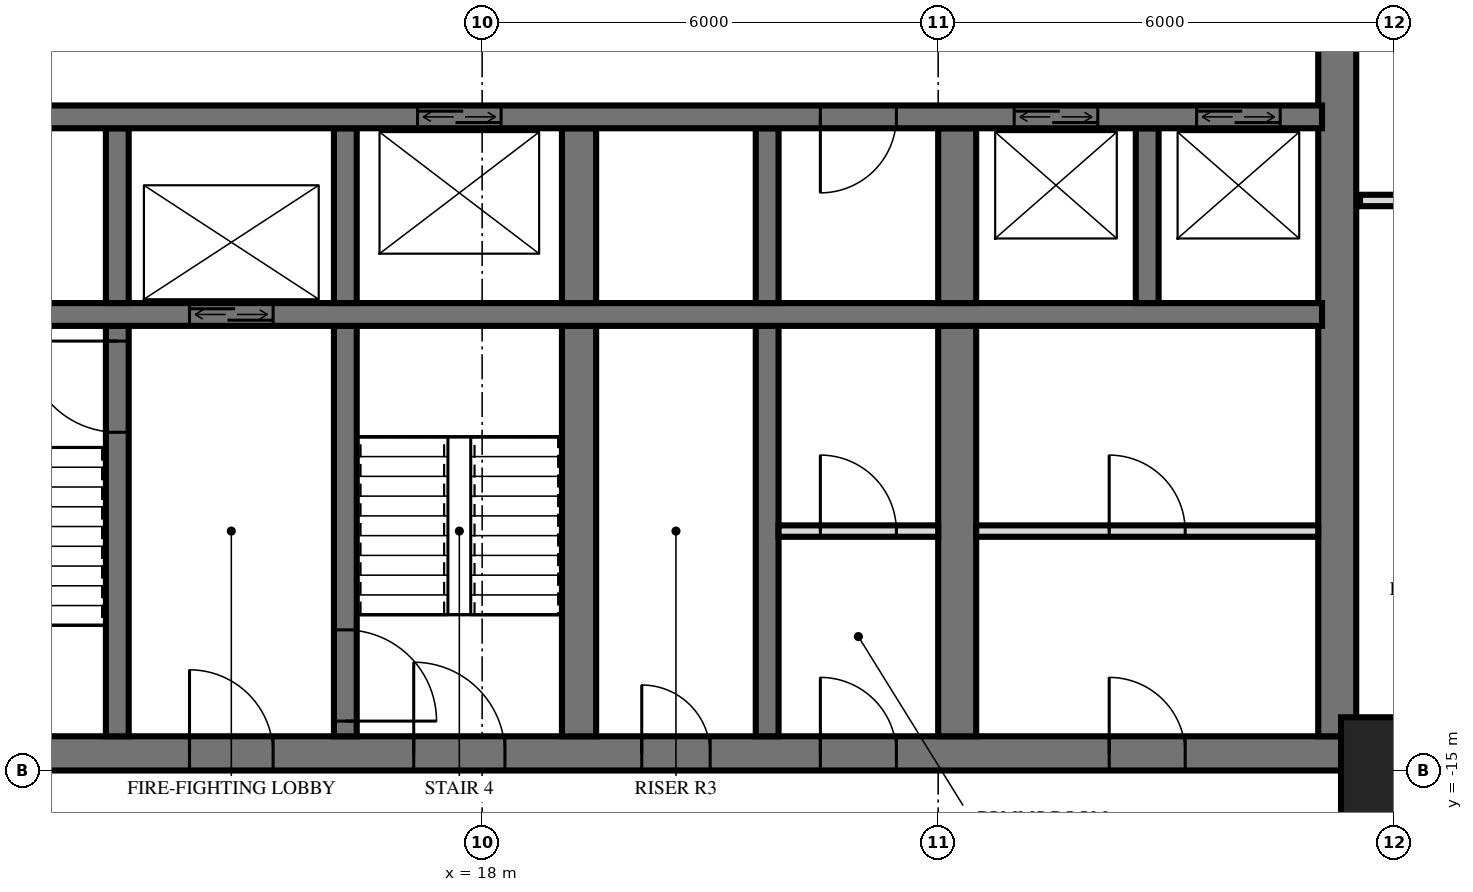
"""IFC4 building model, lengths in metres.
Left out: names, types, materials, properties, quantities, classifications, styles, units other than length and angle.
Written with IfcOpenShell. Run it as: python <this file> out.ifc"""

import sys

from ifc_helpers import new_model, si_unit, direction, frame, frame_2d, origin, origin_2d, place, context, subcontext, project, spatial, rectangle, extrude, element, fill, save


model = new_model("IFC4")
c1 = context("Model", 3, precision=1e-05, world=origin(), true_north=direction((0.0, 1.0)))
c2 = subcontext(c1, "Body", "Model", "MODEL_VIEW")
j1 = project(units=[si_unit("LENGTHUNIT", "METRE"), si_unit("PLANEANGLEUNIT", "RADIAN")], contexts=[c1])
p1 = place(None, origin())
s1 = spatial("IfcSite", under=j1, at=p1, CompositionType="ELEMENT")
p2 = place(p1, origin())
s2 = spatial("IfcBuilding", under=s1, at=p2, CompositionType="ELEMENT")
p3 = place(p2, frame((0.0, 0.0, 24.0)))
s3 = spatial("IfcBuildingStorey", under=s2, at=p3, CompositionType="ELEMENT", Elevation=24.0)
p4 = place(p3, frame((30.0, -15.0, -0.28), z_axis=(0.0, 0.0, 1.0), x_axis=(1.0, 0.0, 0.0)))
e1 = element("IfcColumn", 1, at=p4, inside=s3, PredefinedType="COLUMN", context=c2, shape_type="SweptSolid", body=[
    extrude(rectangle(XDim=1.4, YDim=1.4, at=origin_2d()), origin(), (0.0, 0.0, 1.0), 3.88),
])
p5 = place(p3, frame((10.0, -14.775, 0.0), z_axis=(0.0, 0.0, 1.0), x_axis=(1.0, 0.0, 0.0)))
e2 = element("IfcWall", 2, at=p5, inside=s3, PredefinedType="SHEAR", context=c2, shape_type="SweptSolid", body=[
    extrude(rectangle(XDim=19.5, YDim=0.45, at=frame_2d((9.75, 0.0))), origin(), (0.0, 0.0, 1.0), 3.6),
])
p6 = place(p5, frame((7.1, 0.0, 0.0)))
e3 = element("IfcOpeningElement", 3, at=p6, cuts=e2, PredefinedType="OPENING", context=c2, shape_type="SweptSolid", body=[
    extrude(rectangle(XDim=1.2, YDim=2.1, at=frame_2d((0.6, 1.05))), frame((0.0, 0.235, 0.0), z_axis=(0.0, -1.0, 0.0), x_axis=(1.0, 0.0, 0.0)), (0.0, 0.0, 1.0), 0.47),
])
p7 = place(p5, frame((4.15, 0.0, 0.0)))
e4 = element("IfcOpeningElement", 4, at=p7, cuts=e2, PredefinedType="OPENING", context=c2, shape_type="SweptSolid", body=[
    extrude(rectangle(XDim=1.1, YDim=2.1, at=frame_2d((0.55, 1.05))), frame((0.0, 0.235, 0.0), z_axis=(0.0, -1.0, 0.0), x_axis=(1.0, 0.0, 0.0)), (0.0, 0.0, 1.0), 0.47),
])
p8 = place(p5, frame((10.1, 0.0, 0.0)))
e5 = element("IfcOpeningElement", 5, at=p8, cuts=e2, PredefinedType="OPENING", context=c2, shape_type="SweptSolid", body=[
    extrude(rectangle(XDim=0.9, YDim=2.1, at=frame_2d((0.45, 1.05))), frame((0.0, 0.235, 0.0), z_axis=(0.0, -1.0, 0.0), x_axis=(1.0, 0.0, 0.0)), (0.0, 0.0, 1.0), 0.47),
])
p9 = place(p5, frame((12.45, 0.0, 0.0)))
e6 = element("IfcOpeningElement", 6, at=p9, cuts=e2, PredefinedType="OPENING", context=c2, shape_type="SweptSolid", body=[
    extrude(rectangle(XDim=1.0, YDim=2.1, at=frame_2d((0.5, 1.05))), frame((0.0, 0.235, 0.0), z_axis=(0.0, -1.0, 0.0), x_axis=(1.0, 0.0, 0.0)), (0.0, 0.0, 1.0), 0.47),
])
p10 = place(p5, frame((16.25, 0.0, 0.0)))
e7 = element("IfcOpeningElement", 7, at=p10, cuts=e2, PredefinedType="OPENING", context=c2, shape_type="SweptSolid", body=[
    extrude(rectangle(XDim=1.0, YDim=2.1, at=frame_2d((0.5, 1.05))), frame((0.0, 0.235, 0.0), z_axis=(0.0, -1.0, 0.0), x_axis=(1.0, 0.0, 0.0)), (0.0, 0.0, 1.0), 0.47),
])
p11 = place(p3, frame((29.25, -14.55, 0.0), z_axis=(0.0, 0.0, 1.0), x_axis=(0.0, 1.0, 0.0)))
e8 = element("IfcWall", 8, at=p11, inside=s3, PredefinedType="SHEAR", context=c2, shape_type="SweptSolid", body=[
    extrude(rectangle(XDim=14.1, YDim=0.5, at=frame_2d((7.05, 0.0))), origin(), (0.0, 0.0, 1.0), 3.6),
])
p12 = place(p3, frame((10.35, -6.4, 0.0), z_axis=(0.0, 0.0, 1.0), x_axis=(1.0, 0.0, 0.0)))
e9 = element("IfcWall", 9, at=p12, inside=s3, PredefinedType="SHEAR", context=c2, shape_type="SweptSolid", body=[
    extrude(rectangle(XDim=18.7, YDim=0.3, at=frame_2d((9.35, 0.0))), origin(), (0.0, 0.0, 1.0), 3.6),
])
p13 = place(p12, frame((14.65, 0.0, 0.0)))
e10 = element("IfcOpeningElement", 10, at=p13, cuts=e9, PredefinedType="OPENING", context=c2, shape_type="SweptSolid", body=[
    extrude(rectangle(XDim=1.1, YDim=2.1, at=frame_2d((0.55, 1.05))), frame((0.0, 0.16, 0.0), z_axis=(0.0, -1.0, 0.0), x_axis=(1.0, 0.0, 0.0)), (0.0, 0.0, 1.0), 0.32),
])
p14 = place(p12, frame((17.05, 0.0, 0.0)))
e11 = element("IfcOpeningElement", 11, at=p14, cuts=e9, PredefinedType="OPENING", context=c2, shape_type="SweptSolid", body=[
    extrude(rectangle(XDim=1.1, YDim=2.1, at=frame_2d((0.55, 1.05))), frame((0.0, 0.16, 0.0), z_axis=(0.0, -1.0, 0.0), x_axis=(1.0, 0.0, 0.0)), (0.0, 0.0, 1.0), 0.32),
])
p15 = place(p12, frame((6.8, 0.0, 0.0)))
e12 = element("IfcOpeningElement", 12, at=p15, cuts=e9, PredefinedType="OPENING", context=c2, shape_type="SweptSolid", body=[
    extrude(rectangle(XDim=1.1, YDim=2.1, at=frame_2d((0.55, 1.05))), frame((0.0, 0.16, 0.0), z_axis=(0.0, -1.0, 0.0), x_axis=(1.0, 0.0, 0.0)), (0.0, 0.0, 1.0), 0.32),
])
p16 = place(p12, frame((12.1, 0.0, 0.0)))
e13 = element("IfcOpeningElement", 13, at=p16, cuts=e9, PredefinedType="OPENING", context=c2, shape_type="SweptSolid", body=[
    extrude(rectangle(XDim=1.0, YDim=2.1, at=frame_2d((0.5, 1.05))), frame((0.0, 0.16, 0.0), z_axis=(0.0, -1.0, 0.0), x_axis=(1.0, 0.0, 0.0)), (0.0, 0.0, 1.0), 0.32),
])
p17 = place(p3, frame((10.35, -9.0, 0.0), z_axis=(0.0, 0.0, 1.0), x_axis=(1.0, 0.0, 0.0)))
e14 = element("IfcWall", 14, at=p17, inside=s3, PredefinedType="SHEAR", context=c2, shape_type="SweptSolid", body=[
    extrude(rectangle(XDim=18.7, YDim=0.3, at=frame_2d((9.35, 0.0))), origin(), (0.0, 0.0, 1.0), 3.6),
])
p18 = place(p17, frame((3.8, 0.0, 0.0)))
e15 = element("IfcOpeningElement", 15, at=p18, cuts=e14, PredefinedType="OPENING", context=c2, shape_type="SweptSolid", body=[
    extrude(rectangle(XDim=1.1, YDim=2.1, at=frame_2d((0.55, 1.05))), frame((0.0, 0.16, 0.0), z_axis=(0.0, -1.0, 0.0), x_axis=(1.0, 0.0, 0.0)), (0.0, 0.0, 1.0), 0.32),
])
p19 = place(p3, frame((13.2, -8.85, 0.0), z_axis=(0.0, 0.0, 1.0), x_axis=(0.0, 1.0, 0.0)))
e16 = element("IfcWall", 16, at=p19, inside=s3, PredefinedType="SHEAR", context=c2, shape_type="SweptSolid", body=[
    extrude(rectangle(XDim=2.3, YDim=0.3, at=frame_2d((1.15, 0.0))), origin(), (0.0, 0.0, 1.0), 3.6),
])
p20 = place(p3, frame((13.2, -14.55, 0.0), z_axis=(0.0, 0.0, 1.0), x_axis=(0.0, 1.0, 0.0)))
e17 = element("IfcWall", 17, at=p20, inside=s3, PredefinedType="SHEAR", context=c2, shape_type="SweptSolid", body=[
    extrude(rectangle(XDim=5.4, YDim=0.3, at=frame_2d((2.7, 0.0))), origin(), (0.0, 0.0, 1.0), 3.6),
])
p21 = place(p20, frame((4.0, 0.0, 0.0)))
e18 = element("IfcOpeningElement", 18, at=p21, cuts=e17, PredefinedType="OPENING", context=c2, shape_type="SweptSolid", body=[
    extrude(rectangle(XDim=1.2, YDim=2.1, at=frame_2d((0.6, 1.05))), frame((0.0, 0.16, 0.0), z_axis=(0.0, -1.0, 0.0), x_axis=(1.0, 0.0, 0.0)), (0.0, 0.0, 1.0), 0.32),
])
p22 = place(p3, frame((16.2, -8.85, 0.0), z_axis=(0.0, 0.0, 1.0), x_axis=(0.0, 1.0, 0.0)))
e19 = element("IfcWall", 19, at=p22, inside=s3, PredefinedType="SHEAR", context=c2, shape_type="SweptSolid", body=[
    extrude(rectangle(XDim=2.3, YDim=0.3, at=frame_2d((1.15, 0.0))), origin(), (0.0, 0.0, 1.0), 3.6),
])
p23 = place(p3, frame((16.2, -14.55, 0.0), z_axis=(0.0, 0.0, 1.0), x_axis=(0.0, 1.0, 0.0)))
e20 = element("IfcWall", 20, at=p23, inside=s3, PredefinedType="SHEAR", context=c2, shape_type="SweptSolid", body=[
    extrude(rectangle(XDim=5.4, YDim=0.3, at=frame_2d((2.7, 0.0))), origin(), (0.0, 0.0, 1.0), 3.6),
])
p24 = place(p23, frame((0.2, 0.0, 0.0)))
e21 = element("IfcOpeningElement", 21, at=p24, cuts=e20, PredefinedType="OPENING", context=c2, shape_type="SweptSolid", body=[
    extrude(rectangle(XDim=1.2, YDim=2.1, at=frame_2d((0.6, 1.05))), frame((0.0, 0.16, 0.0), z_axis=(0.0, -1.0, 0.0), x_axis=(1.0, 0.0, 0.0)), (0.0, 0.0, 1.0), 0.32),
])
p25 = place(p3, frame((19.275, -8.85, 0.0), z_axis=(0.0, 0.0, 1.0), x_axis=(0.0, 1.0, 0.0)))
e22 = element("IfcWall", 22, at=p25, inside=s3, PredefinedType="SHEAR", context=c2, shape_type="SweptSolid", body=[
    extrude(rectangle(XDim=2.3, YDim=0.45, at=frame_2d((1.15, 0.0))), origin(), (0.0, 0.0, 1.0), 3.6),
])
p26 = place(p3, frame((19.275, -14.55, 0.0), z_axis=(0.0, 0.0, 1.0), x_axis=(0.0, 1.0, 0.0)))
e23 = element("IfcWall", 23, at=p26, inside=s3, PredefinedType="SHEAR", context=c2, shape_type="SweptSolid", body=[
    extrude(rectangle(XDim=5.4, YDim=0.45, at=frame_2d((2.7, 0.0))), origin(), (0.0, 0.0, 1.0), 3.6),
])
p27 = place(p3, frame((21.75, -8.85, 0.0), z_axis=(0.0, 0.0, 1.0), x_axis=(0.0, 1.0, 0.0)))
e24 = element("IfcWall", 24, at=p27, inside=s3, PredefinedType="SHEAR", context=c2, shape_type="SweptSolid", body=[
    extrude(rectangle(XDim=2.3, YDim=0.3, at=frame_2d((1.15, 0.0))), origin(), (0.0, 0.0, 1.0), 3.6),
])
p28 = place(p3, frame((21.75, -14.55, 0.0), z_axis=(0.0, 0.0, 1.0), x_axis=(0.0, 1.0, 0.0)))
e25 = element("IfcWall", 25, at=p28, inside=s3, PredefinedType="SHEAR", context=c2, shape_type="SweptSolid", body=[
    extrude(rectangle(XDim=5.4, YDim=0.3, at=frame_2d((2.7, 0.0))), origin(), (0.0, 0.0, 1.0), 3.6),
])
p29 = place(p3, frame((24.25, -8.85, 0.0), z_axis=(0.0, 0.0, 1.0), x_axis=(0.0, 1.0, 0.0)))
e26 = element("IfcWall", 26, at=p29, inside=s3, PredefinedType="SHEAR", context=c2, shape_type="SweptSolid", body=[
    extrude(rectangle(XDim=2.3, YDim=0.5, at=frame_2d((1.15, 0.0))), origin(), (0.0, 0.0, 1.0), 3.6),
])
p30 = place(p3, frame((24.25, -14.55, 0.0), z_axis=(0.0, 0.0, 1.0), x_axis=(0.0, 1.0, 0.0)))
e27 = element("IfcWall", 27, at=p30, inside=s3, PredefinedType="SHEAR", context=c2, shape_type="SweptSolid", body=[
    extrude(rectangle(XDim=5.4, YDim=0.5, at=frame_2d((2.7, 0.0))), origin(), (0.0, 0.0, 1.0), 3.6),
])
p31 = place(p3, frame((26.75, -8.85, 0.0), z_axis=(0.0, 0.0, 1.0), x_axis=(0.0, 1.0, 0.0)))
e28 = element("IfcWall", 28, at=p31, inside=s3, PredefinedType="SHEAR", context=c2, shape_type="SweptSolid", body=[
    extrude(rectangle(XDim=2.3, YDim=0.3, at=frame_2d((1.15, 0.0))), origin(), (0.0, 0.0, 1.0), 3.6),
])
p32 = place(p3, frame((21.9, -11.85, 0.0), z_axis=(0.0, 0.0, 1.0), x_axis=(1.0, 0.0, 0.0)))
e29 = element("IfcWall", 29, at=p32, inside=s3, PredefinedType="PARTITIONING", context=c2, shape_type="SweptSolid", body=[
    extrude(rectangle(XDim=2.1, YDim=0.15, at=frame_2d((1.05, 0.0))), origin(), (0.0, 0.0, 1.0), 3.3),
])
p33 = place(p32, frame((0.55, 0.0, 0.0)))
e30 = element("IfcOpeningElement", 30, at=p33, cuts=e29, PredefinedType="OPENING", context=c2, shape_type="SweptSolid", body=[
    extrude(rectangle(XDim=1.0, YDim=2.1, at=frame_2d((0.5, 1.05))), frame((0.0, 0.085, 0.0), z_axis=(0.0, -1.0, 0.0), x_axis=(1.0, 0.0, 0.0)), (0.0, 0.0, 1.0), 0.17),
])
p34 = place(p3, frame((24.5, -11.85, 0.0), z_axis=(0.0, 0.0, 1.0), x_axis=(1.0, 0.0, 0.0)))
e31 = element("IfcWall", 31, at=p34, inside=s3, PredefinedType="PARTITIONING", context=c2, shape_type="SweptSolid", body=[
    extrude(rectangle(XDim=4.5, YDim=0.15, at=frame_2d((2.25, 0.0))), origin(), (0.0, 0.0, 1.0), 3.3),
])
p35 = place(p34, frame((1.75, 0.0, 0.0)))
e32 = element("IfcOpeningElement", 32, at=p35, cuts=e31, PredefinedType="OPENING", context=c2, shape_type="SweptSolid", body=[
    extrude(rectangle(XDim=1.0, YDim=2.1, at=frame_2d((0.5, 1.05))), frame((0.0, 0.085, 0.0), z_axis=(0.0, -1.0, 0.0), x_axis=(1.0, 0.0, 0.0)), (0.0, 0.0, 1.0), 0.17),
])
p36 = place(p3, frame((29.55, -15.0, 0.0), z_axis=(0.0, 0.0, 1.0), x_axis=(1.0, 0.0, 0.0)))
e33 = element("IfcWall", 33, at=p36, inside=s3, PredefinedType="PARTITIONING", context=c2, shape_type="SweptSolid", body=[
    extrude(rectangle(XDim=3.57, YDim=0.15, at=frame_2d((1.785, 0.0))), origin(), (0.0, 0.0, 1.0), 3.32),
])
p37 = place(p36, frame((1.205, 0.0, 0.0)))
e34 = element("IfcOpeningElement", 34, at=p37, cuts=e33, PredefinedType="OPENING", context=c2, shape_type="SweptSolid", body=[
    extrude(rectangle(XDim=0.8, YDim=2.1, at=frame_2d((0.4, 1.05))), frame((0.0, 0.085, 0.0), z_axis=(0.0, -1.0, 0.0), x_axis=(1.0, 0.0, 0.0)), (0.0, 0.0, 1.0), 0.17),
])
p38 = place(p3, frame((29.55, -7.5, 0.0), z_axis=(0.0, 0.0, 1.0), x_axis=(1.0, 0.0, 0.0)))
e35 = element("IfcWall", 35, at=p38, inside=s3, PredefinedType="PLUMBINGWALL", context=c2, shape_type="SweptSolid", body=[
    extrude(rectangle(XDim=3.57, YDim=0.15, at=frame_2d((1.785, 0.0))), origin(), (0.0, 0.0, 1.0), 3.32),
])
p39 = place(p38, frame((1.4, 0.0, 0.0)))
e36 = element("IfcOpeningElement", 36, at=p39, cuts=e35, PredefinedType="OPENING", context=c2, shape_type="SweptSolid", body=[
    extrude(rectangle(XDim=0.9, YDim=2.1, at=frame_2d((0.45, 1.05))), frame((0.0, 0.085, 0.0), z_axis=(0.0, -1.0, 0.0), x_axis=(1.0, 0.0, 0.0)), (0.0, 0.0, 1.0), 0.17),
])
p40 = place(p13, origin())
e37 = element("IfcDoor", 37, at=p40, inside=s3, OperationType="DOUBLE_DOOR_SLIDING", PredefinedType="USERDEFINED", context=c2, shape_type="SweptSolid", body=[
    extrude(rectangle(XDim=1.1, YDim=2.1, at=frame_2d((0.55, 1.05))), frame((0.0, 0.025, 0.0), z_axis=(0.0, -1.0, 0.0), x_axis=(1.0, 0.0, 0.0)), (0.0, 0.0, 1.0), 0.05),
])
fill(e10, e37)
p41 = place(p14, origin())
e38 = element("IfcDoor", 38, at=p41, inside=s3, OperationType="DOUBLE_DOOR_SLIDING", PredefinedType="USERDEFINED", context=c2, shape_type="SweptSolid", body=[
    extrude(rectangle(XDim=1.1, YDim=2.1, at=frame_2d((0.55, 1.05))), frame((0.0, 0.025, 0.0), z_axis=(0.0, -1.0, 0.0), x_axis=(1.0, 0.0, 0.0)), (0.0, 0.0, 1.0), 0.05),
])
fill(e11, e38)
p42 = place(p18, origin())
e39 = element("IfcDoor", 39, at=p42, inside=s3, OperationType="DOUBLE_DOOR_SLIDING", PredefinedType="USERDEFINED", context=c2, shape_type="SweptSolid", body=[
    extrude(rectangle(XDim=1.1, YDim=2.1, at=frame_2d((0.55, 1.05))), frame((0.0, 0.025, 0.0), z_axis=(0.0, -1.0, 0.0), x_axis=(1.0, 0.0, 0.0)), (0.0, 0.0, 1.0), 0.05),
])
fill(e15, e39)
p43 = place(p15, origin())
e40 = element("IfcDoor", 40, at=p43, inside=s3, OperationType="DOUBLE_DOOR_SLIDING", PredefinedType="USERDEFINED", context=c2, shape_type="SweptSolid", body=[
    extrude(rectangle(XDim=1.1, YDim=2.1, at=frame_2d((0.55, 1.05))), frame((0.0, 0.025, 0.0), z_axis=(0.0, -1.0, 0.0), x_axis=(1.0, 0.0, 0.0)), (0.0, 0.0, 1.0), 0.05),
])
fill(e12, e40)
p44 = place(p6, origin())
e41 = element("IfcDoor", 41, at=p44, inside=s3, OperationType="SINGLE_SWING_RIGHT", PredefinedType="DOOR", context=c2, shape_type="SweptSolid", body=[
    extrude(rectangle(XDim=1.2, YDim=2.1, at=frame_2d((0.6, 1.05))), frame((0.0, 0.025, 0.0), z_axis=(0.0, -1.0, 0.0), x_axis=(1.0, 0.0, 0.0)), (0.0, 0.0, 1.0), 0.05),
])
fill(e3, e41)
p45 = place(p7, origin())
e42 = element("IfcDoor", 42, at=p45, inside=s3, OperationType="SINGLE_SWING_RIGHT", PredefinedType="DOOR", context=c2, shape_type="SweptSolid", body=[
    extrude(rectangle(XDim=1.1, YDim=2.1, at=frame_2d((0.55, 1.05))), frame((0.0, 0.025, 0.0), z_axis=(0.0, -1.0, 0.0), x_axis=(1.0, 0.0, 0.0)), (0.0, 0.0, 1.0), 0.05),
])
fill(e4, e42)
p46 = place(p8, origin())
e43 = element("IfcDoor", 43, at=p46, inside=s3, OperationType="SINGLE_SWING_RIGHT", PredefinedType="DOOR", context=c2, shape_type="SweptSolid", body=[
    extrude(rectangle(XDim=0.9, YDim=2.1, at=frame_2d((0.45, 1.05))), frame((0.0, 0.025, 0.0), z_axis=(0.0, -1.0, 0.0), x_axis=(1.0, 0.0, 0.0)), (0.0, 0.0, 1.0), 0.05),
])
fill(e5, e43)
p47 = place(p9, origin())
e44 = element("IfcDoor", 44, at=p47, inside=s3, OperationType="SINGLE_SWING_RIGHT", PredefinedType="DOOR", context=c2, shape_type="SweptSolid", body=[
    extrude(rectangle(XDim=1.0, YDim=2.1, at=frame_2d((0.5, 1.05))), frame((0.0, 0.025, 0.0), z_axis=(0.0, -1.0, 0.0), x_axis=(1.0, 0.0, 0.0)), (0.0, 0.0, 1.0), 0.05),
])
fill(e6, e44)
p48 = place(p10, origin())
e45 = element("IfcDoor", 45, at=p48, inside=s3, OperationType="SINGLE_SWING_RIGHT", PredefinedType="DOOR", context=c2, shape_type="SweptSolid", body=[
    extrude(rectangle(XDim=1.0, YDim=2.1, at=frame_2d((0.5, 1.05))), frame((0.0, 0.025, 0.0), z_axis=(0.0, -1.0, 0.0), x_axis=(1.0, 0.0, 0.0)), (0.0, 0.0, 1.0), 0.05),
])
fill(e7, e45)
p49 = place(p16, frame((0.5, 0.0, 0.0), z_axis=(0.0, 0.0, 1.0), x_axis=(-1.0, 0.0, 0.0)))
e46 = element("IfcDoor", 46, at=p49, inside=s3, OperationType="SINGLE_SWING_LEFT", PredefinedType="DOOR", context=c2, shape_type="SweptSolid", body=[
    extrude(rectangle(XDim=1.0, YDim=2.1, at=frame_2d((0.0, 1.05))), frame((0.0, -0.025, 0.0), z_axis=(0.0, 1.0, 0.0), x_axis=(-1.0, 0.0, 0.0)), (0.0, 0.0, 1.0), 0.05),
])
fill(e13, e46)
p50 = place(p21, origin())
e47 = element("IfcDoor", 47, at=p50, inside=s3, OperationType="SINGLE_SWING_LEFT", PredefinedType="DOOR", context=c2, shape_type="SweptSolid", body=[
    extrude(rectangle(XDim=1.2, YDim=2.1, at=frame_2d((0.6, 1.05))), frame((0.0, 0.025, 0.0), z_axis=(0.0, -1.0, 0.0), x_axis=(1.0, 0.0, 0.0)), (0.0, 0.0, 1.0), 0.05),
])
fill(e18, e47)
p51 = place(p24, frame((0.6, 0.0, 0.0), z_axis=(0.0, 0.0, 1.0), x_axis=(-1.0, 0.0, 0.0)))
e48 = element("IfcDoor", 48, at=p51, inside=s3, OperationType="SINGLE_SWING_LEFT", PredefinedType="DOOR", context=c2, shape_type="SweptSolid", body=[
    extrude(rectangle(XDim=1.2, YDim=2.1, at=frame_2d((0.0, 1.05))), frame((0.0, -0.025, 0.0), z_axis=(0.0, 1.0, 0.0), x_axis=(-1.0, 0.0, 0.0)), (0.0, 0.0, 1.0), 0.05),
])
fill(e21, e48)
p52 = place(p33, origin())
e49 = element("IfcDoor", 49, at=p52, inside=s3, OperationType="SINGLE_SWING_RIGHT", PredefinedType="DOOR", context=c2, shape_type="SweptSolid", body=[
    extrude(rectangle(XDim=1.0, YDim=2.1, at=frame_2d((0.5, 1.05))), frame((0.0, 0.025, 0.0), z_axis=(0.0, -1.0, 0.0), x_axis=(1.0, 0.0, 0.0)), (0.0, 0.0, 1.0), 0.05),
])
fill(e30, e49)
p53 = place(p35, origin())
e50 = element("IfcDoor", 50, at=p53, inside=s3, OperationType="SINGLE_SWING_RIGHT", PredefinedType="DOOR", context=c2, shape_type="SweptSolid", body=[
    extrude(rectangle(XDim=1.0, YDim=2.1, at=frame_2d((0.5, 1.05))), frame((0.0, 0.025, 0.0), z_axis=(0.0, -1.0, 0.0), x_axis=(1.0, 0.0, 0.0)), (0.0, 0.0, 1.0), 0.05),
])
fill(e32, e50)
save(model, sys.argv[1])
